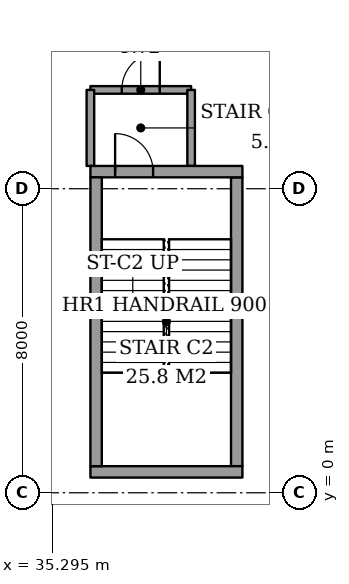
"""IFC4 building model, lengths in metres.
Left out: names, types, materials, properties, quantities, classifications, styles, units other than length and angle.
Written with IfcOpenShell. Run it as: python <this file> out.ifc"""

import sys

from ifc_helpers import new_model, si_unit, direction, frame, frame_2d, origin, place, context, subcontext, project, spatial, rectangle, extrude, element, fill, save


model = new_model("IFC4")
c1 = context("Model", 3, precision=1e-05, world=origin(), true_north=direction((0.0, 1.0)))
c2 = subcontext(c1, "Body", "Model", "MODEL_VIEW")
j1 = project(units=[si_unit("LENGTHUNIT", "METRE"), si_unit("PLANEANGLEUNIT", "RADIAN")], contexts=[c1])
p1 = place(None, origin())
s1 = spatial("IfcSite", under=j1, at=p1, CompositionType="ELEMENT")
p2 = place(p1, origin())
s2 = spatial("IfcBuilding", under=s1, at=p2, CompositionType="ELEMENT")
p3 = place(p2, frame((0.0, 0.0, -5.0)))
s3 = spatial("IfcBuildingStorey", under=s2, at=p3, CompositionType="ELEMENT", Elevation=-5.0)
p4 = place(p3, frame((36.3, 10.6, 0.0), z_axis=(0.0, 0.0, 1.0), x_axis=(1.0, 0.0, 0.0)))
e1 = element("IfcWall", 1, at=p4, inside=s3, PredefinedType="PARTITIONING", context=c2, shape_type="SweptSolid", body=[
    extrude(rectangle(XDim=2.65, YDim=0.2, at=frame_2d((1.325, 0.0))), origin(), (0.0, 0.0, 1.0), 4.7),
])
p5 = place(p4, frame((0.825, 0.0, 0.0)))
e2 = element("IfcOpeningElement", 2, at=p5, cuts=e1, PredefinedType="OPENING", context=c2, shape_type="SweptSolid", body=[
    extrude(rectangle(XDim=1.0, YDim=2.1, at=frame_2d((0.5, 1.05))), frame((0.0, 0.11, 0.0), z_axis=(0.0, -1.0, 0.0), x_axis=(1.0, 0.0, 0.0)), (0.0, 0.0, 1.0), 0.22),
])
for number, where, z_axis, x_axis in (
    (3, (36.3, 8.6, 0.0), (0.0, 0.0, 1.0), (0.0, 1.0, 0.0)),
    (4, (38.95, 8.6, 0.0), (0.0, 0.0, 1.0), (0.0, 1.0, 0.0)),
):
    element("IfcWall", number, at=place(p3, frame(where, z_axis=z_axis, x_axis=x_axis)), inside=s3, PredefinedType="PARTITIONING", context=c2, shape_type="SweptSolid", body=[
        extrude(rectangle(XDim=2.0, YDim=0.2, at=frame_2d((1.0, 0.0))), origin(), (0.0, 0.0, 1.0), 4.7),
    ])
p6 = place(p3, frame((36.3, 0.55, 0.0), z_axis=(0.0, 0.0, 1.0), x_axis=(1.0, 0.0, 0.0)))
e5 = element("IfcWall", 5, at=p6, inside=s3, PredefinedType="PARTITIONING", context=c2, shape_type="SweptSolid", body=[
    extrude(rectangle(XDim=4.0, YDim=0.3, at=frame_2d((2.0, 0.0))), origin(), (0.0, 0.0, 1.0), 5.0),
])
p7 = place(p3, frame((36.3, 8.45, 0.0), z_axis=(0.0, 0.0, 1.0), x_axis=(1.0, 0.0, 0.0)))
e6 = element("IfcWall", 6, at=p7, inside=s3, PredefinedType="PARTITIONING", context=c2, shape_type="SweptSolid", body=[
    extrude(rectangle(XDim=4.0, YDim=0.3, at=frame_2d((2.0, 0.0))), origin(), (0.0, 0.0, 1.0), 5.0),
])
p8 = place(p7, frame((0.65, 0.0, 0.0)))
e7 = element("IfcOpeningElement", 7, at=p8, cuts=e6, PredefinedType="OPENING", context=c2, shape_type="SweptSolid", body=[
    extrude(rectangle(XDim=1.0, YDim=2.1, at=frame_2d((0.5, 1.05))), frame((0.0, 0.16, 0.0), z_axis=(0.0, -1.0, 0.0), x_axis=(1.0, 0.0, 0.0)), (0.0, 0.0, 1.0), 0.32),
])
for number, where, z_axis, x_axis in (
    (8, (36.45, 0.7, 0.0), (0.0, 0.0, 1.0), (0.0, 1.0, 0.0)),
    (9, (40.15, 0.7, 0.0), (0.0, 0.0, 1.0), (0.0, 1.0, 0.0)),
):
    element("IfcWall", number, at=place(p3, frame(where, z_axis=z_axis, x_axis=x_axis)), inside=s3, PredefinedType="PARTITIONING", context=c2, shape_type="SweptSolid", body=[
        extrude(rectangle(XDim=7.6, YDim=0.3, at=frame_2d((3.8, 0.0))), origin(), (0.0, 0.0, 1.0), 5.0),
    ])
p9 = place(p5, origin())
e10 = element("IfcDoor", 10, at=p9, inside=s3, OperationType="SINGLE_SWING_LEFT", PredefinedType="DOOR", context=c2, shape_type="SweptSolid", body=[
    extrude(rectangle(XDim=1.0, YDim=2.1, at=frame_2d((0.5, 1.05))), frame((0.0, 0.025, 0.0), z_axis=(0.0, -1.0, 0.0), x_axis=(1.0, 0.0, 0.0)), (0.0, 0.0, 1.0), 0.05),
])
fill(e2, e10)
p10 = place(p8, origin())
e11 = element("IfcDoor", 11, at=p10, inside=s3, OperationType="SINGLE_SWING_RIGHT", PredefinedType="DOOR", context=c2, shape_type="SweptSolid", body=[
    extrude(rectangle(XDim=1.0, YDim=2.1, at=frame_2d((0.5, 1.05))), frame((0.0, 0.025, 0.0), z_axis=(0.0, -1.0, 0.0), x_axis=(1.0, 0.0, 0.0)), (0.0, 0.0, 1.0), 0.05),
])
fill(e7, e11)
save(model, sys.argv[1])
